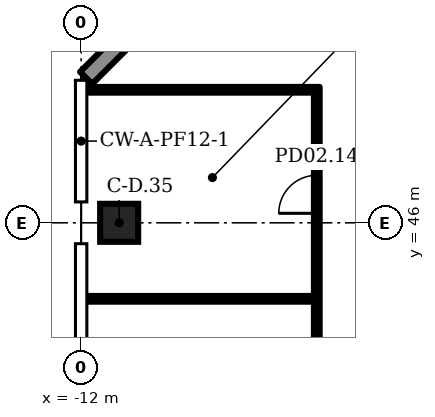
"""IFC4 building model, lengths in metres.
Left out: names, types, materials, properties, quantities, classifications, styles, units other than length and angle.
Written with IfcOpenShell. Run it as: python <this file> out.ifc"""

import sys

from ifc_helpers import new_model, si_unit, direction, frame, frame_2d, origin, origin_2d, place, context, subcontext, project, spatial, rectangle, extrude, element, fill, save


model = new_model("IFC4")
c1 = context("Model", 3, precision=1e-05, world=origin(), true_north=direction((0.0, 1.0)))
c2 = subcontext(c1, "Body", "Model", "MODEL_VIEW")
j1 = project(units=[si_unit("LENGTHUNIT", "METRE"), si_unit("PLANEANGLEUNIT", "RADIAN")], contexts=[c1])
p1 = place(None, origin())
s1 = spatial("IfcSite", under=j1, at=p1, CompositionType="ELEMENT")
p2 = place(p1, origin())
s2 = spatial("IfcBuilding", under=s1, at=p2, CompositionType="ELEMENT")
p3 = place(p2, frame((0.0, 0.0, 15.0)))
s3 = spatial("IfcBuildingStorey", under=s2, at=p3, CompositionType="ELEMENT", Elevation=15.0)
p4 = place(p3, frame((-11.0, 46.0, 0.0), z_axis=(0.0, 0.0, 1.0), x_axis=(1.0, 0.0, 0.0)))
e1 = element("IfcColumn", 1, at=p4, inside=s3, PredefinedType="COLUMN", context=c2, shape_type="SweptSolid", body=[
    extrude(rectangle(XDim=1.0, YDim=1.0, at=origin_2d()), origin(), (0.0, 0.0, 1.0), 6.5),
])
p5 = place(p3, frame((-5.912, 55.77, 0.0), z_axis=(0.0, 0.0, 1.0), x_axis=(-0.707092, -0.707121, 0.0)))
e2 = element("IfcWall", 2, at=p5, inside=s3, PredefinedType="SOLIDWALL", context=c2, shape_type="SweptSolid", body=[
    extrude(rectangle(XDim=8.425, YDim=0.45, at=frame_2d((4.213, 0.0))), origin(), (0.0, 0.0, 1.0), 6.2),
])
p6 = place(p3, frame((-5.8, 32.925, 0.0), z_axis=(0.0, 0.0, 1.0), x_axis=(0.0, 1.0, 0.0)))
e3 = element("IfcWall", 3, at=p6, inside=s3, PredefinedType="PARTITIONING", context=c2, shape_type="SweptSolid", body=[
    extrude(rectangle(XDim=16.65, YDim=0.15, at=frame_2d((8.325, 0.0))), origin(), (0.0, 0.0, 1.0), 6.2),
])
p7 = place(p6, frame((2.325, 0.0, 0.0)))
e4 = element("IfcOpeningElement", 4, at=p7, cuts=e3, PredefinedType="OPENING", context=c2, shape_type="SweptSolid", body=[
    extrude(rectangle(XDim=1.0, YDim=2.1, at=frame_2d((0.5, 1.05))), frame((0.0, 0.085, 0.0), z_axis=(0.0, -1.0, 0.0), x_axis=(1.0, 0.0, 0.0)), (0.0, 0.0, 1.0), 0.17),
])
p8 = place(p6, frame((7.825, 0.0, 0.0)))
e5 = element("IfcOpeningElement", 5, at=p8, cuts=e3, PredefinedType="OPENING", context=c2, shape_type="SweptSolid", body=[
    extrude(rectangle(XDim=1.0, YDim=2.1, at=frame_2d((0.5, 1.05))), frame((0.0, 0.085, 0.0), z_axis=(0.0, -1.0, 0.0), x_axis=(1.0, 0.0, 0.0)), (0.0, 0.0, 1.0), 0.17),
])
p9 = place(p6, frame((13.325, 0.0, 0.0)))
e6 = element("IfcOpeningElement", 6, at=p9, cuts=e3, PredefinedType="OPENING", context=c2, shape_type="SweptSolid", body=[
    extrude(rectangle(XDim=1.0, YDim=2.1, at=frame_2d((0.5, 1.05))), frame((0.0, 0.085, 0.0), z_axis=(0.0, -1.0, 0.0), x_axis=(1.0, 0.0, 0.0)), (0.0, 0.0, 1.0), 0.17),
])
for number, where, z_axis, x_axis in (
    (7, (-11.895, 44.0, 0.0), (0.0, 0.0, 1.0), (1.0, 0.0, 0.0)),
    (8, (-11.895, 49.5, 0.0), (0.0, 0.0, 1.0), (1.0, 0.0, 0.0)),
):
    element("IfcWall", number, at=place(p3, frame(where, z_axis=z_axis, x_axis=x_axis)), inside=s3, PredefinedType="PARTITIONING", context=c2, shape_type="SweptSolid", body=[
        extrude(rectangle(XDim=6.02, YDim=0.15, at=frame_2d((3.01, 0.0))), origin(), (0.0, 0.0, 1.0), 6.2),
    ])
p10 = place(p9, origin())
e9 = element("IfcDoor", 9, at=p10, inside=s3, OperationType="SINGLE_SWING_LEFT", PredefinedType="DOOR", context=c2, shape_type="SweptSolid", body=[
    extrude(rectangle(XDim=1.0, YDim=2.1, at=frame_2d((0.5, 1.05))), frame((0.0, 0.025, 0.0), z_axis=(0.0, -1.0, 0.0), x_axis=(1.0, 0.0, 0.0)), (0.0, 0.0, 1.0), 0.05),
])
fill(e6, e9)
save(model, sys.argv[1])
